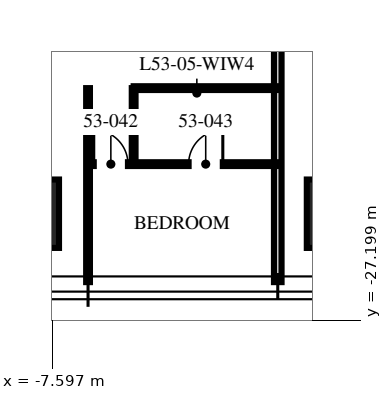
"""IFC4 building model, lengths in metres.
Left out: names, types, materials, properties, quantities, classifications, styles, units other than length and angle.
Written with IfcOpenShell. Run it as: python <this file> out.ifc"""

import sys

from ifc_helpers import new_model, si_unit, direction, frame, frame_2d, origin, origin_2d, place, context, subcontext, project, spatial, rectangle, extrude, element, fill, save


model = new_model("IFC4")
c1 = context("Model", 3, precision=1e-05, world=origin(), true_north=direction((0.0, 1.0)))
c2 = subcontext(c1, "Body", "Model", "MODEL_VIEW")
j1 = project(units=[si_unit("LENGTHUNIT", "METRE"), si_unit("PLANEANGLEUNIT", "RADIAN")], contexts=[c1])
p1 = place(None, origin())
s1 = spatial("IfcSite", under=j1, at=p1, CompositionType="ELEMENT")
p2 = place(p1, origin())
s2 = spatial("IfcBuilding", under=s1, at=p2, CompositionType="ELEMENT")
p3 = place(p2, frame((0.0, 0.0, 214.5)))
s3 = spatial("IfcBuildingStorey", under=s2, at=p3, CompositionType="ELEMENT", Elevation=214.5)
for number, where, z_axis, x_axis in (
    (1, (0.0, -24.4, 0.0), (0.0, 0.0, 1.0), (1.0, 0.0, 0.0)),
    (2, (-8.32, -24.4, 0.0), (0.0, 0.0, 1.0), (1.0, 0.0, 0.0)),
):
    element("IfcColumn", number, at=place(p3, frame(where, z_axis=z_axis, x_axis=x_axis)), inside=s3, PredefinedType="COLUMN", context=c2, shape_type="SweptSolid", body=[
        extrude(rectangle(XDim=1.8, YDim=1.8, at=origin_2d()), origin(), (0.0, 0.0, 1.0), 3.75),
    ])
p4 = place(p3, frame((-6.656, -21.095, 0.0), z_axis=(0.0, 0.0, 1.0), x_axis=(0.0, -1.0, 0.0)))
e3 = element("IfcWall", 3, at=p4, inside=s3, PredefinedType="PARTITIONING", context=c2, shape_type="SweptSolid", body=[
    extrude(rectangle(XDim=5.105, YDim=0.1, at=frame_2d((2.552, 0.0))), origin(), (0.0, 0.0, 1.0), 2.91),
])
p5 = place(p3, frame((-1.664, -12.8, 0.0), z_axis=(0.0, 0.0, 1.0), x_axis=(0.0, -1.0, 0.0)))
e4 = element("IfcWall", 4, at=p5, inside=s3, PredefinedType="PARTITIONING", context=c2, shape_type="SweptSolid", body=[
    extrude(rectangle(XDim=13.4, YDim=0.2, at=frame_2d((6.7, 0.0))), origin(), (0.0, 0.0, 1.0), 2.91),
])
p6 = place(p3, frame((-6.656, -23.095, 0.0), z_axis=(0.0, 0.0, 1.0), x_axis=(1.0, 0.0, 0.0)))
e5 = element("IfcWall", 5, at=p6, inside=s3, PredefinedType="PARTITIONING", context=c2, shape_type="SweptSolid", body=[
    extrude(rectangle(XDim=4.992, YDim=0.1, at=frame_2d((2.496, 0.0))), origin(), (0.0, 0.0, 1.0), 2.81),
])
p7 = place(p6, frame((0.15, 0.0, 0.0)))
e6 = element("IfcOpeningElement", 6, at=p7, cuts=e5, PredefinedType="OPENING", context=c2, shape_type="SweptSolid", body=[
    extrude(rectangle(XDim=0.9, YDim=2.1, at=frame_2d((0.45, 1.05))), frame((0.0, 0.06, 0.0), z_axis=(0.0, -1.0, 0.0), x_axis=(1.0, 0.0, 0.0)), (0.0, 0.0, 1.0), 0.12),
])
p8 = place(p6, frame((2.646, 0.0, 0.0)))
e7 = element("IfcOpeningElement", 7, at=p8, cuts=e5, PredefinedType="OPENING", context=c2, shape_type="SweptSolid", body=[
    extrude(rectangle(XDim=0.9, YDim=2.1, at=frame_2d((0.45, 1.05))), frame((0.0, 0.06, 0.0), z_axis=(0.0, -1.0, 0.0), x_axis=(1.0, 0.0, 0.0)), (0.0, 0.0, 1.0), 0.12),
])
p9 = place(p3, frame((-5.456, -21.095, 0.0), z_axis=(0.0, 0.0, 1.0), x_axis=(0.0, -1.0, 0.0)))
e8 = element("IfcWall", 8, at=p9, inside=s3, PredefinedType="PARTITIONING", context=c2, shape_type="SweptSolid", body=[
    extrude(rectangle(XDim=2.0, YDim=0.1, at=frame_2d((1.0, 0.0))), origin(), (0.0, 0.0, 1.0), 3.5),
])
p10 = place(p3, frame((-5.456, -21.095, 0.0), z_axis=(0.0, 0.0, 1.0), x_axis=(1.0, 0.0, 0.0)))
e9 = element("IfcWall", 9, at=p10, inside=s3, PredefinedType="PARTITIONING", context=c2, shape_type="SweptSolid", body=[
    extrude(rectangle(XDim=3.792, YDim=0.1, at=frame_2d((1.896, 0.0))), origin(), (0.0, 0.0, 1.0), 2.81),
])
p11 = place(p7, origin())
e10 = element("IfcDoor", 10, at=p11, inside=s3, OperationType="SINGLE_SWING_LEFT", PredefinedType="DOOR", context=c2, shape_type="SweptSolid", body=[
    extrude(rectangle(XDim=0.9, YDim=2.1, at=frame_2d((0.45, 1.05))), frame((0.0, 0.025, 0.0), z_axis=(0.0, -1.0, 0.0), x_axis=(1.0, 0.0, 0.0)), (0.0, 0.0, 1.0), 0.05),
])
fill(e6, e10)
p12 = place(p8, origin())
e11 = element("IfcDoor", 11, at=p12, inside=s3, OperationType="SINGLE_SWING_RIGHT", PredefinedType="DOOR", context=c2, shape_type="SweptSolid", body=[
    extrude(rectangle(XDim=0.9, YDim=2.1, at=frame_2d((0.45, 1.05))), frame((0.0, 0.025, 0.0), z_axis=(0.0, -1.0, 0.0), x_axis=(1.0, 0.0, 0.0)), (0.0, 0.0, 1.0), 0.05),
])
fill(e7, e11)
save(model, sys.argv[1])
